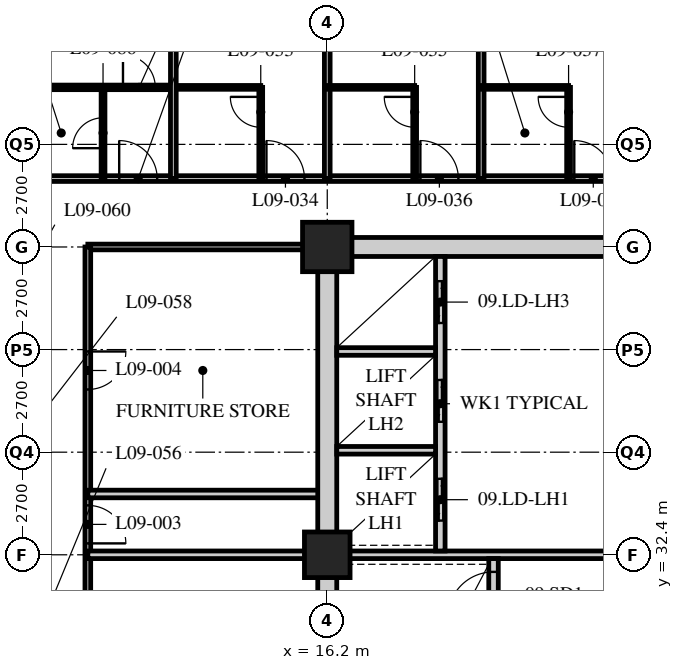
"""IFC4 building model, lengths in metres.
Left out: names, types, materials, properties, quantities, classifications, styles, units other than length and angle.
Written with IfcOpenShell. Run it as: python <this file> out.ifc"""

import sys

from ifc_helpers import new_model, si_unit, direction, frame, frame_2d, origin, origin_2d, place, context, subcontext, project, spatial, rectangle, hollow_rectangle, extrude, element, fill, save


model = new_model("IFC4")
c1 = context("Model", 3, precision=1e-05, world=origin(), true_north=direction((0.0, 1.0)))
c2 = subcontext(c1, "Body", "Model", "MODEL_VIEW")
j1 = project(units=[si_unit("LENGTHUNIT", "METRE"), si_unit("PLANEANGLEUNIT", "RADIAN")], contexts=[c1])
p1 = place(None, origin())
s1 = spatial("IfcSite", under=j1, at=p1, CompositionType="ELEMENT")
p2 = place(p1, origin())
s2 = spatial("IfcBuilding", under=s1, at=p2, CompositionType="ELEMENT")
p3 = place(p2, frame((0.0, 0.0, 43.2)))
s3 = spatial("IfcBuildingStorey", under=s2, at=p3, CompositionType="ELEMENT", Elevation=43.2)
p4 = place(p3, frame((16.2, 32.4, 0.0), z_axis=(0.0, 0.0, 1.0), x_axis=(1.0, 0.0, 0.0)))
e1 = element("IfcColumn", 1, at=p4, inside=s3, PredefinedType="COLUMN", context=c2, shape_type="SweptSolid", body=[
    extrude(hollow_rectangle(XDim=1.2, YDim=1.2, WallThickness=0.12, at=origin_2d()), origin(), (0.0, 0.0, 1.0), 3.4),
])
p5 = place(p3, frame((16.2, 40.5, 0.0), z_axis=(0.0, 0.0, 1.0), x_axis=(1.0, 0.0, 0.0)))
e2 = element("IfcColumn", 2, at=p5, inside=s3, PredefinedType="COLUMN", context=c2, shape_type="SweptSolid", body=[
    extrude(hollow_rectangle(XDim=1.3, YDim=1.3, WallThickness=0.13, at=origin_2d()), origin(), (0.0, 0.0, 1.0), 3.4),
])
p6 = place(p3, frame((8.1, 42.3, 0.0), z_axis=(0.0, 0.0, 1.0), x_axis=(1.0, 0.0, 0.0)))
e3 = element("IfcWall", 3, at=p6, inside=s3, PredefinedType="PARTITIONING", context=c2, shape_type="SweptSolid", body=[
    extrude(rectangle(XDim=40.5, YDim=0.15, at=frame_2d((20.25, 0.0))), origin(), (0.0, 0.0, 1.0), 3.19),
])
p7 = place(p6, frame((6.5, 0.0, 0.0)))
e4 = element("IfcOpeningElement", 4, at=p7, cuts=e3, PredefinedType="OPENING", context=c2, shape_type="SweptSolid", body=[
    extrude(rectangle(XDim=1.0, YDim=2.1, at=frame_2d((0.5, 1.05))), frame((0.0, 0.085, 0.0), z_axis=(0.0, -1.0, 0.0), x_axis=(1.0, 0.0, 0.0)), (0.0, 0.0, 1.0), 0.17),
])
p8 = place(p6, frame((10.55, 0.0, 0.0)))
e5 = element("IfcOpeningElement", 5, at=p8, cuts=e3, PredefinedType="OPENING", context=c2, shape_type="SweptSolid", body=[
    extrude(rectangle(XDim=1.0, YDim=2.1, at=frame_2d((0.5, 1.05))), frame((0.0, 0.085, 0.0), z_axis=(0.0, -1.0, 0.0), x_axis=(1.0, 0.0, 0.0)), (0.0, 0.0, 1.0), 0.17),
])
p9 = place(p6, frame((14.6, 0.0, 0.0)))
e6 = element("IfcOpeningElement", 6, at=p9, cuts=e3, PredefinedType="OPENING", context=c2, shape_type="SweptSolid", body=[
    extrude(rectangle(XDim=1.0, YDim=2.1, at=frame_2d((0.5, 1.05))), frame((0.0, 0.085, 0.0), z_axis=(0.0, -1.0, 0.0), x_axis=(1.0, 0.0, 0.0)), (0.0, 0.0, 1.0), 0.17),
])
p10 = place(p6, frame((18.65, 0.0, 0.0)))
e7 = element("IfcOpeningElement", 7, at=p10, cuts=e3, PredefinedType="OPENING", context=c2, shape_type="SweptSolid", body=[
    extrude(rectangle(XDim=1.0, YDim=2.1, at=frame_2d((0.5, 1.05))), frame((0.0, 0.085, 0.0), z_axis=(0.0, -1.0, 0.0), x_axis=(1.0, 0.0, 0.0)), (0.0, 0.0, 1.0), 0.17),
])
p11 = place(p6, frame((22.7, 0.0, 0.0)))
e8 = element("IfcOpeningElement", 8, at=p11, cuts=e3, PredefinedType="OPENING", context=c2, shape_type="SweptSolid", body=[
    extrude(rectangle(XDim=1.0, YDim=2.1, at=frame_2d((0.5, 1.05))), frame((0.0, 0.085, 0.0), z_axis=(0.0, -1.0, 0.0), x_axis=(1.0, 0.0, 0.0)), (0.0, 0.0, 1.0), 0.17),
])
p12 = place(p6, frame((26.75, 0.0, 0.0)))
e9 = element("IfcOpeningElement", 9, at=p12, cuts=e3, PredefinedType="OPENING", context=c2, shape_type="SweptSolid", body=[
    extrude(rectangle(XDim=1.0, YDim=2.1, at=frame_2d((0.5, 1.05))), frame((0.0, 0.085, 0.0), z_axis=(0.0, -1.0, 0.0), x_axis=(1.0, 0.0, 0.0)), (0.0, 0.0, 1.0), 0.17),
])
p13 = place(p6, frame((30.8, 0.0, 0.0)))
e10 = element("IfcOpeningElement", 10, at=p13, cuts=e3, PredefinedType="OPENING", context=c2, shape_type="SweptSolid", body=[
    extrude(rectangle(XDim=1.0, YDim=2.1, at=frame_2d((0.5, 1.05))), frame((0.0, 0.085, 0.0), z_axis=(0.0, -1.0, 0.0), x_axis=(1.0, 0.0, 0.0)), (0.0, 0.0, 1.0), 0.17),
])
p14 = place(p6, frame((34.85, 0.0, 0.0)))
e11 = element("IfcOpeningElement", 11, at=p14, cuts=e3, PredefinedType="OPENING", context=c2, shape_type="SweptSolid", body=[
    extrude(rectangle(XDim=1.0, YDim=2.1, at=frame_2d((0.5, 1.05))), frame((0.0, 0.085, 0.0), z_axis=(0.0, -1.0, 0.0), x_axis=(1.0, 0.0, 0.0)), (0.0, 0.0, 1.0), 0.17),
])
p15 = place(p6, frame((36.875, 0.0, 0.0)))
e12 = element("IfcOpeningElement", 12, at=p15, cuts=e3, PredefinedType="OPENING", context=c2, shape_type="SweptSolid", body=[
    extrude(rectangle(XDim=1.0, YDim=2.1, at=frame_2d((0.5, 1.05))), frame((0.0, 0.085, 0.0), z_axis=(0.0, -1.0, 0.0), x_axis=(1.0, 0.0, 0.0)), (0.0, 0.0, 1.0), 0.17),
])
p16 = place(p6, frame((2.625, 0.0, 0.0)))
e13 = element("IfcOpeningElement", 13, at=p16, cuts=e3, PredefinedType="OPENING", context=c2, shape_type="SweptSolid", body=[
    extrude(rectangle(XDim=1.0, YDim=2.1, at=frame_2d((0.5, 1.05))), frame((0.0, 0.085, 0.0), z_axis=(0.0, -1.0, 0.0), x_axis=(1.0, 0.0, 0.0)), (0.0, 0.0, 1.0), 0.17),
])
p17 = place(p3, frame((16.0, 40.5, 0.0), z_axis=(0.0, 0.0, 1.0), x_axis=(-1.0, 0.0, 0.0)))
e14 = element("IfcWall", 14, at=p17, inside=s3, PredefinedType="PARTITIONING", context=c2, shape_type="SweptSolid", body=[
    extrude(rectangle(XDim=6.1, YDim=0.15, at=frame_2d((3.05, 0.0))), origin(), (0.0, 0.0, 1.0), 2.578),
])
p18 = place(p3, frame((9.9, 40.5, 0.0), z_axis=(0.0, 0.0, 1.0), x_axis=(0.0, -1.0, 0.0)))
e15 = element("IfcWall", 15, at=p18, inside=s3, PredefinedType="PARTITIONING", context=c2, shape_type="SweptSolid", body=[
    extrude(rectangle(XDim=22.5, YDim=0.15, at=frame_2d((11.25, 0.0))), origin(), (0.0, 0.0, 1.0), 3.19),
])
p19 = place(p18, frame((14.271, 0.0, 0.0)))
e16 = element("IfcOpeningElement", 16, at=p19, cuts=e15, PredefinedType="OPENING", context=c2, shape_type="SweptSolid", body=[
    extrude(rectangle(XDim=1.0, YDim=2.1, at=frame_2d((0.5, 1.05))), frame((0.0, 0.085, 0.0), z_axis=(0.0, -1.0, 0.0), x_axis=(1.0, 0.0, 0.0)), (0.0, 0.0, 1.0), 0.17),
])
p20 = place(p18, frame((10.221, 0.0, 0.0)))
e17 = element("IfcOpeningElement", 17, at=p20, cuts=e15, PredefinedType="OPENING", context=c2, shape_type="SweptSolid", body=[
    extrude(rectangle(XDim=1.0, YDim=2.1, at=frame_2d((0.5, 1.05))), frame((0.0, 0.085, 0.0), z_axis=(0.0, -1.0, 0.0), x_axis=(1.0, 0.0, 0.0)), (0.0, 0.0, 1.0), 0.17),
])
p21 = place(p18, frame((6.8, 0.0, 0.0)))
e18 = element("IfcOpeningElement", 18, at=p21, cuts=e15, PredefinedType="OPENING", context=c2, shape_type="SweptSolid", body=[
    extrude(rectangle(XDim=1.0, YDim=2.1, at=frame_2d((0.5, 1.05))), frame((0.0, 0.085, 0.0), z_axis=(0.0, -1.0, 0.0), x_axis=(1.0, 0.0, 0.0)), (0.0, 0.0, 1.0), 0.17),
])
p22 = place(p18, frame((2.75, 0.0, 0.0)))
e19 = element("IfcOpeningElement", 19, at=p22, cuts=e15, PredefinedType="OPENING", context=c2, shape_type="SweptSolid", body=[
    extrude(rectangle(XDim=1.0, YDim=2.1, at=frame_2d((0.5, 1.05))), frame((0.0, 0.085, 0.0), z_axis=(0.0, -1.0, 0.0), x_axis=(1.0, 0.0, 0.0)), (0.0, 0.0, 1.0), 0.17),
])
p23 = place(p3, frame((9.9, 32.4, 0.0), z_axis=(0.0, 0.0, 1.0), x_axis=(1.0, 0.0, 0.0)))
e20 = element("IfcWall", 20, at=p23, inside=s3, PredefinedType="SOLIDWALL", context=c2, shape_type="SweptSolid", body=[
    extrude(rectangle(XDim=6.3, YDim=0.2, at=frame_2d((3.15, 0.0))), origin(), (0.0, 0.0, 1.0), 2.578),
])
p24 = place(p3, frame((9.9, 34.0, 0.0), z_axis=(0.0, 0.0, 1.0), x_axis=(1.0, 0.0, 0.0)))
e21 = element("IfcWall", 21, at=p24, inside=s3, PredefinedType="SOLIDWALL", context=c2, shape_type="SweptSolid", body=[
    extrude(rectangle(XDim=6.3, YDim=0.2, at=frame_2d((3.15, 0.0))), origin(), (0.0, 0.0, 1.0), 3.19),
])
p25 = place(p3, frame((12.15, 44.7, 0.0), z_axis=(0.0, 0.0, 1.0), x_axis=(1.0, 0.0, 0.0)))
e22 = element("IfcWall", 22, at=p25, inside=s3, PredefinedType="PARTITIONING", context=c2, shape_type="SweptSolid", body=[
    extrude(rectangle(XDim=2.3, YDim=0.1, at=frame_2d((1.15, 0.0))), origin(), (0.0, 0.0, 1.0), 3.19),
])
p26 = place(p3, frame((14.45, 42.3, 0.0), z_axis=(0.0, 0.0, 1.0), x_axis=(0.0, 1.0, 0.0)))
e23 = element("IfcWall", 23, at=p26, inside=s3, PredefinedType="PARTITIONING", context=c2, shape_type="SweptSolid", body=[
    extrude(rectangle(XDim=2.4, YDim=0.1, at=frame_2d((1.2, 0.0))), origin(), (0.0, 0.0, 1.0), 3.19),
])
p27 = place(p26, frame((1.35, 0.0, 0.0)))
e24 = element("IfcOpeningElement", 24, at=p27, cuts=e23, PredefinedType="OPENING", context=c2, shape_type="SweptSolid", body=[
    extrude(rectangle(XDim=0.8, YDim=2.1, at=frame_2d((0.4, 1.05))), frame((0.0, 0.06, 0.0), z_axis=(0.0, -1.0, 0.0), x_axis=(1.0, 0.0, 0.0)), (0.0, 0.0, 1.0), 0.12),
])
p28 = place(p3, frame((16.2, 42.3, 0.0), z_axis=(0.0, 0.0, 1.0), x_axis=(0.0, 1.0, 0.0)))
e25 = element("IfcWall", 25, at=p28, inside=s3, PredefinedType="PARTITIONING", context=c2, shape_type="SweptSolid", body=[
    extrude(rectangle(XDim=6.0, YDim=0.15, at=frame_2d((3.0, 0.0))), origin(), (0.0, 0.0, 1.0), 2.578),
])
p29 = place(p3, frame((16.2, 44.7, 0.0), z_axis=(0.0, 0.0, 1.0), x_axis=(1.0, 0.0, 0.0)))
e26 = element("IfcWall", 26, at=p29, inside=s3, PredefinedType="PARTITIONING", context=c2, shape_type="SweptSolid", body=[
    extrude(rectangle(XDim=2.3, YDim=0.1, at=frame_2d((1.15, 0.0))), origin(), (0.0, 0.0, 1.0), 3.19),
])
p30 = place(p3, frame((18.5, 42.3, 0.0), z_axis=(0.0, 0.0, 1.0), x_axis=(0.0, 1.0, 0.0)))
e27 = element("IfcWall", 27, at=p30, inside=s3, PredefinedType="PARTITIONING", context=c2, shape_type="SweptSolid", body=[
    extrude(rectangle(XDim=2.4, YDim=0.1, at=frame_2d((1.2, 0.0))), origin(), (0.0, 0.0, 1.0), 3.19),
])
p31 = place(p30, frame((1.35, 0.0, 0.0)))
e28 = element("IfcOpeningElement", 28, at=p31, cuts=e27, PredefinedType="OPENING", context=c2, shape_type="SweptSolid", body=[
    extrude(rectangle(XDim=0.8, YDim=2.1, at=frame_2d((0.4, 1.05))), frame((0.0, 0.06, 0.0), z_axis=(0.0, -1.0, 0.0), x_axis=(1.0, 0.0, 0.0)), (0.0, 0.0, 1.0), 0.12),
])
p32 = place(p3, frame((20.25, 42.3, 0.0), z_axis=(0.0, 0.0, 1.0), x_axis=(0.0, 1.0, 0.0)))
e29 = element("IfcWall", 29, at=p32, inside=s3, PredefinedType="PARTITIONING", context=c2, shape_type="SweptSolid", body=[
    extrude(rectangle(XDim=6.0, YDim=0.15, at=frame_2d((3.0, 0.0))), origin(), (0.0, 0.0, 1.0), 3.19),
])
p33 = place(p3, frame((20.25, 44.7, 0.0), z_axis=(0.0, 0.0, 1.0), x_axis=(1.0, 0.0, 0.0)))
e30 = element("IfcWall", 30, at=p33, inside=s3, PredefinedType="PARTITIONING", context=c2, shape_type="SweptSolid", body=[
    extrude(rectangle(XDim=2.3, YDim=0.1, at=frame_2d((1.15, 0.0))), origin(), (0.0, 0.0, 1.0), 3.19),
])
p34 = place(p3, frame((22.55, 42.3, 0.0), z_axis=(0.0, 0.0, 1.0), x_axis=(0.0, 1.0, 0.0)))
e31 = element("IfcWall", 31, at=p34, inside=s3, PredefinedType="PARTITIONING", context=c2, shape_type="SweptSolid", body=[
    extrude(rectangle(XDim=2.4, YDim=0.1, at=frame_2d((1.2, 0.0))), origin(), (0.0, 0.0, 1.0), 3.19),
])
p35 = place(p34, frame((1.35, 0.0, 0.0)))
e32 = element("IfcOpeningElement", 32, at=p35, cuts=e31, PredefinedType="OPENING", context=c2, shape_type="SweptSolid", body=[
    extrude(rectangle(XDim=0.8, YDim=2.1, at=frame_2d((0.4, 1.05))), frame((0.0, 0.06, 0.0), z_axis=(0.0, -1.0, 0.0), x_axis=(1.0, 0.0, 0.0)), (0.0, 0.0, 1.0), 0.12),
])
p36 = place(p3, frame((8.1, 44.7, 0.0), z_axis=(0.0, 0.0, 1.0), x_axis=(1.0, 0.0, 0.0)))
e33 = element("IfcWall", 33, at=p36, inside=s3, PredefinedType="PARTITIONING", context=c2, shape_type="SweptSolid", body=[
    extrude(rectangle(XDim=4.05, YDim=0.12, at=frame_2d((2.025, 0.0))), origin(), (0.0, 0.0, 1.0), 3.19),
])
p37 = place(p36, frame((2.725, 0.0, 0.0)))
e34 = element("IfcOpeningElement", 34, at=p37, cuts=e33, PredefinedType="OPENING", context=c2, shape_type="SweptSolid", body=[
    extrude(rectangle(XDim=0.85, YDim=2.1, at=frame_2d((0.425, 1.05))), frame((0.0, 0.07, 0.0), z_axis=(0.0, -1.0, 0.0), x_axis=(1.0, 0.0, 0.0)), (0.0, 0.0, 1.0), 0.14),
])
p38 = place(p3, frame((10.3, 42.3, 0.0), z_axis=(0.0, 0.0, 1.0), x_axis=(0.0, 1.0, 0.0)))
e35 = element("IfcWall", 35, at=p38, inside=s3, PredefinedType="PARTITIONING", context=c2, shape_type="SweptSolid", body=[
    extrude(rectangle(XDim=2.4, YDim=0.1, at=frame_2d((1.2, 0.0))), origin(), (0.0, 0.0, 1.0), 3.19),
])
p39 = place(p38, frame((0.8, 0.0, 0.0)))
e36 = element("IfcOpeningElement", 36, at=p39, cuts=e35, PredefinedType="OPENING", context=c2, shape_type="SweptSolid", body=[
    extrude(rectangle(XDim=0.8, YDim=2.1, at=frame_2d((0.4, 1.05))), frame((0.0, 0.06, 0.0), z_axis=(0.0, -1.0, 0.0), x_axis=(1.0, 0.0, 0.0)), (0.0, 0.0, 1.0), 0.12),
])
p40 = place(p3, frame((12.15, 42.3, 0.0), z_axis=(0.0, 0.0, 1.0), x_axis=(0.0, 1.0, 0.0)))
e37 = element("IfcWall", 37, at=p40, inside=s3, PredefinedType="PARTITIONING", context=c2, shape_type="SweptSolid", body=[
    extrude(rectangle(XDim=6.0, YDim=0.15, at=frame_2d((3.0, 0.0))), origin(), (0.0, 0.0, 1.0), 3.19),
])
p41 = place(p3, frame((15.95, 40.5, 0.0), z_axis=(0.0, 0.0, 1.0), x_axis=(1.0, 0.0, 0.0)))
e38 = element("IfcWall", 38, at=p41, inside=s3, PredefinedType="SOLIDWALL", context=c2, shape_type="SweptSolid", body=[
    extrude(rectangle(XDim=24.8, YDim=0.5, at=frame_2d((12.4, 0.0))), origin(), (0.0, 0.0, 1.0), 2.54),
])
p42 = place(p41, frame((11.5, 0.0, 0.0)))
e39 = element("IfcOpeningElement", 39, at=p42, cuts=e38, PredefinedType="OPENING", context=c2, shape_type="SweptSolid", body=[
    extrude(rectangle(XDim=1.8, YDim=2.4, at=frame_2d((0.9, 1.2))), frame((0.0, 0.26, 0.0), z_axis=(0.0, -1.0, 0.0), x_axis=(1.0, 0.0, 0.0)), (0.0, 0.0, 1.0), 0.52),
])
p43 = place(p3, frame((16.2, 24.55, 0.0), z_axis=(0.0, 0.0, 1.0), x_axis=(0.0, 1.0, 0.0)))
e40 = element("IfcWall", 40, at=p43, inside=s3, PredefinedType="SOLIDWALL", context=c2, shape_type="SweptSolid", body=[
    extrude(rectangle(XDim=15.7, YDim=0.5, at=frame_2d((7.85, 0.0))), origin(), (0.0, 0.0, 1.0), 2.578),
])
p44 = place(p3, frame((16.45, 32.4, 0.0), z_axis=(0.0, 0.0, 1.0), x_axis=(1.0, 0.0, 0.0)))
e41 = element("IfcWall", 41, at=p44, inside=s3, PredefinedType="SOLIDWALL", context=c2, shape_type="SweptSolid", body=[
    extrude(rectangle(XDim=7.95, YDim=0.2, at=frame_2d((3.975, 0.0))), origin(), (0.0, 0.0, 1.0), 2.578),
])
p45 = place(p3, frame((20.575, 24.55, 0.0), z_axis=(0.0, 0.0, 1.0), x_axis=(0.0, 1.0, 0.0)))
e42 = element("IfcWall", 42, at=p45, inside=s3, PredefinedType="SOLIDWALL", context=c2, shape_type="SweptSolid", body=[
    extrude(rectangle(XDim=7.75, YDim=0.25, at=frame_2d((3.875, 0.0))), origin(), (0.0, 0.0, 1.0), 3.19),
])
p46 = place(p45, frame((6.2, 0.0, 0.0)))
e43 = element("IfcOpeningElement", 43, at=p46, cuts=e42, PredefinedType="OPENING", context=c2, shape_type="SweptSolid", body=[
    extrude(rectangle(XDim=1.2, YDim=2.1, at=frame_2d((0.6, 1.05))), frame((0.0, 0.135, 0.0), z_axis=(0.0, -1.0, 0.0), x_axis=(1.0, 0.0, 0.0)), (0.0, 0.0, 1.0), 0.27),
])
p47 = place(p3, frame((19.175, 32.5, 0.0), z_axis=(0.0, 0.0, 1.0), x_axis=(0.0, 1.0, 0.0)))
e44 = element("IfcWall", 44, at=p47, inside=s3, PredefinedType="SOLIDWALL", context=c2, shape_type="SweptSolid", body=[
    extrude(rectangle(XDim=7.75, YDim=0.25, at=frame_2d((3.875, 0.0))), origin(), (0.0, 0.0, 1.0), 3.19),
])
p48 = place(p47, frame((0.8, 0.0, 0.0)))
e45 = element("IfcOpeningElement", 45, at=p48, cuts=e44, PredefinedType="OPENING", context=c2, shape_type="SweptSolid", body=[
    extrude(rectangle(XDim=1.1, YDim=2.4, at=frame_2d((0.55, 1.2))), frame((0.0, 0.135, 0.0), z_axis=(0.0, -1.0, 0.0), x_axis=(1.0, 0.0, 0.0)), (0.0, 0.0, 1.0), 0.27),
])
p49 = place(p47, frame((3.4, 0.0, 0.0)))
e46 = element("IfcOpeningElement", 46, at=p49, cuts=e44, PredefinedType="OPENING", context=c2, shape_type="SweptSolid", body=[
    extrude(rectangle(XDim=1.1, YDim=2.4, at=frame_2d((0.55, 1.2))), frame((0.0, 0.135, 0.0), z_axis=(0.0, -1.0, 0.0), x_axis=(1.0, 0.0, 0.0)), (0.0, 0.0, 1.0), 0.27),
])
p50 = place(p47, frame((6.0, 0.0, 0.0)))
e47 = element("IfcOpeningElement", 47, at=p50, cuts=e44, PredefinedType="OPENING", context=c2, shape_type="SweptSolid", body=[
    extrude(rectangle(XDim=1.1, YDim=2.4, at=frame_2d((0.55, 1.2))), frame((0.0, 0.135, 0.0), z_axis=(0.0, -1.0, 0.0), x_axis=(1.0, 0.0, 0.0)), (0.0, 0.0, 1.0), 0.27),
])
for number, where, z_axis, x_axis in (
    (48, (16.45, 35.15, 0.0), (0.0, 0.0, 1.0), (1.0, 0.0, 0.0)),
    (49, (16.45, 37.75, 0.0), (0.0, 0.0, 1.0), (1.0, 0.0, 0.0)),
):
    element("IfcWall", number, at=place(p3, frame(where, z_axis=z_axis, x_axis=x_axis)), inside=s3, PredefinedType="SOLIDWALL", context=c2, shape_type="SweptSolid", body=[
        extrude(rectangle(XDim=2.6, YDim=0.2, at=frame_2d((1.3, 0.0))), origin(), (0.0, 0.0, 1.0), 3.19),
    ])
p51 = place(p21, origin())
e50 = element("IfcDoor", 50, at=p51, inside=s3, OperationType="SINGLE_SWING_RIGHT", PredefinedType="DOOR", context=c2, shape_type="SweptSolid", body=[
    extrude(rectangle(XDim=1.0, YDim=2.1, at=frame_2d((0.5, 1.05))), frame((0.0, 0.025, 0.0), z_axis=(0.0, -1.0, 0.0), x_axis=(1.0, 0.0, 0.0)), (0.0, 0.0, 1.0), 0.05),
])
fill(e18, e50)
p52 = place(p22, origin())
e51 = element("IfcDoor", 51, at=p52, inside=s3, OperationType="SINGLE_SWING_LEFT", PredefinedType="DOOR", context=c2, shape_type="SweptSolid", body=[
    extrude(rectangle(XDim=1.0, YDim=2.1, at=frame_2d((0.5, 1.05))), frame((0.0, 0.025, 0.0), z_axis=(0.0, -1.0, 0.0), x_axis=(1.0, 0.0, 0.0)), (0.0, 0.0, 1.0), 0.05),
])
fill(e19, e51)
p53 = place(p27, origin())
e52 = element("IfcDoor", 52, at=p53, inside=s3, OperationType="SINGLE_SWING_RIGHT", PredefinedType="DOOR", context=c2, shape_type="SweptSolid", body=[
    extrude(rectangle(XDim=0.8, YDim=2.1, at=frame_2d((0.4, 1.05))), frame((0.0, 0.025, 0.0), z_axis=(0.0, -1.0, 0.0), x_axis=(1.0, 0.0, 0.0)), (0.0, 0.0, 1.0), 0.05),
])
fill(e24, e52)
p54 = place(p7, origin())
e53 = element("IfcDoor", 53, at=p54, inside=s3, OperationType="SINGLE_SWING_LEFT", PredefinedType="DOOR", context=c2, shape_type="SweptSolid", body=[
    extrude(rectangle(XDim=1.0, YDim=2.1, at=frame_2d((0.5, 1.05))), frame((0.0, 0.025, 0.0), z_axis=(0.0, -1.0, 0.0), x_axis=(1.0, 0.0, 0.0)), (0.0, 0.0, 1.0), 0.05),
])
fill(e4, e53)
p55 = place(p31, origin())
e54 = element("IfcDoor", 54, at=p55, inside=s3, OperationType="SINGLE_SWING_RIGHT", PredefinedType="DOOR", context=c2, shape_type="SweptSolid", body=[
    extrude(rectangle(XDim=0.8, YDim=2.1, at=frame_2d((0.4, 1.05))), frame((0.0, 0.025, 0.0), z_axis=(0.0, -1.0, 0.0), x_axis=(1.0, 0.0, 0.0)), (0.0, 0.0, 1.0), 0.05),
])
fill(e28, e54)
p56 = place(p8, origin())
e55 = element("IfcDoor", 55, at=p56, inside=s3, OperationType="SINGLE_SWING_LEFT", PredefinedType="DOOR", context=c2, shape_type="SweptSolid", body=[
    extrude(rectangle(XDim=1.0, YDim=2.1, at=frame_2d((0.5, 1.05))), frame((0.0, 0.025, 0.0), z_axis=(0.0, -1.0, 0.0), x_axis=(1.0, 0.0, 0.0)), (0.0, 0.0, 1.0), 0.05),
])
fill(e5, e55)
p57 = place(p35, origin())
e56 = element("IfcDoor", 56, at=p57, inside=s3, OperationType="SINGLE_SWING_RIGHT", PredefinedType="DOOR", context=c2, shape_type="SweptSolid", body=[
    extrude(rectangle(XDim=0.8, YDim=2.1, at=frame_2d((0.4, 1.05))), frame((0.0, 0.025, 0.0), z_axis=(0.0, -1.0, 0.0), x_axis=(1.0, 0.0, 0.0)), (0.0, 0.0, 1.0), 0.05),
])
fill(e32, e56)
p58 = place(p9, origin())
e57 = element("IfcDoor", 57, at=p58, inside=s3, OperationType="SINGLE_SWING_LEFT", PredefinedType="DOOR", context=c2, shape_type="SweptSolid", body=[
    extrude(rectangle(XDim=1.0, YDim=2.1, at=frame_2d((0.5, 1.05))), frame((0.0, 0.025, 0.0), z_axis=(0.0, -1.0, 0.0), x_axis=(1.0, 0.0, 0.0)), (0.0, 0.0, 1.0), 0.05),
])
fill(e6, e57)
p59 = place(p39, origin())
e58 = element("IfcDoor", 58, at=p59, inside=s3, OperationType="SINGLE_SWING_LEFT", PredefinedType="DOOR", context=c2, shape_type="SweptSolid", body=[
    extrude(rectangle(XDim=0.8, YDim=2.1, at=frame_2d((0.4, 1.05))), frame((0.0, 0.025, 0.0), z_axis=(0.0, -1.0, 0.0), x_axis=(1.0, 0.0, 0.0)), (0.0, 0.0, 1.0), 0.05),
])
fill(e36, e58)
p60 = place(p16, origin())
e59 = element("IfcDoor", 59, at=p60, inside=s3, OperationType="SINGLE_SWING_LEFT", PredefinedType="DOOR", context=c2, shape_type="SweptSolid", body=[
    extrude(rectangle(XDim=1.0, YDim=2.1, at=frame_2d((0.5, 1.05))), frame((0.0, 0.025, 0.0), z_axis=(0.0, -1.0, 0.0), x_axis=(1.0, 0.0, 0.0)), (0.0, 0.0, 1.0), 0.05),
])
fill(e13, e59)
p61 = place(p37, origin())
e60 = element("IfcDoor", 60, at=p61, inside=s3, OperationType="SINGLE_SWING_LEFT", PredefinedType="DOOR", context=c2, shape_type="SweptSolid", body=[
    extrude(rectangle(XDim=0.85, YDim=2.1, at=frame_2d((0.425, 1.05))), frame((0.0, 0.025, 0.0), z_axis=(0.0, -1.0, 0.0), x_axis=(1.0, 0.0, 0.0)), (0.0, 0.0, 1.0), 0.05),
])
fill(e34, e60)
p62 = place(p46, origin())
e61 = element("IfcDoor", 61, at=p62, inside=s3, OperationType="SINGLE_SWING_LEFT", PredefinedType="DOOR", context=c2, shape_type="SweptSolid", body=[
    extrude(rectangle(XDim=1.2, YDim=2.1, at=frame_2d((0.6, 1.05))), frame((0.0, 0.025, 0.0), z_axis=(0.0, -1.0, 0.0), x_axis=(1.0, 0.0, 0.0)), (0.0, 0.0, 1.0), 0.05),
])
fill(e43, e61)
p63 = place(p48, origin())
e62 = element("IfcDoor", 62, at=p63, inside=s3, OperationType="DOUBLE_DOOR_SLIDING", PredefinedType="DOOR", context=c2, shape_type="SweptSolid", body=[
    extrude(rectangle(XDim=1.1, YDim=2.4, at=frame_2d((0.55, 1.2))), frame((0.0, 0.025, 0.0), z_axis=(0.0, -1.0, 0.0), x_axis=(1.0, 0.0, 0.0)), (0.0, 0.0, 1.0), 0.05),
])
fill(e45, e62)
p64 = place(p49, origin())
e63 = element("IfcDoor", 63, at=p64, inside=s3, OperationType="DOUBLE_DOOR_SLIDING", PredefinedType="DOOR", context=c2, shape_type="SweptSolid", body=[
    extrude(rectangle(XDim=1.1, YDim=2.4, at=frame_2d((0.55, 1.2))), frame((0.0, 0.025, 0.0), z_axis=(0.0, -1.0, 0.0), x_axis=(1.0, 0.0, 0.0)), (0.0, 0.0, 1.0), 0.05),
])
fill(e46, e63)
p65 = place(p50, origin())
e64 = element("IfcDoor", 64, at=p65, inside=s3, OperationType="DOUBLE_DOOR_SLIDING", PredefinedType="DOOR", context=c2, shape_type="SweptSolid", body=[
    extrude(rectangle(XDim=1.1, YDim=2.4, at=frame_2d((0.55, 1.2))), frame((0.0, 0.025, 0.0), z_axis=(0.0, -1.0, 0.0), x_axis=(1.0, 0.0, 0.0)), (0.0, 0.0, 1.0), 0.05),
])
fill(e47, e64)
save(model, sys.argv[1])
